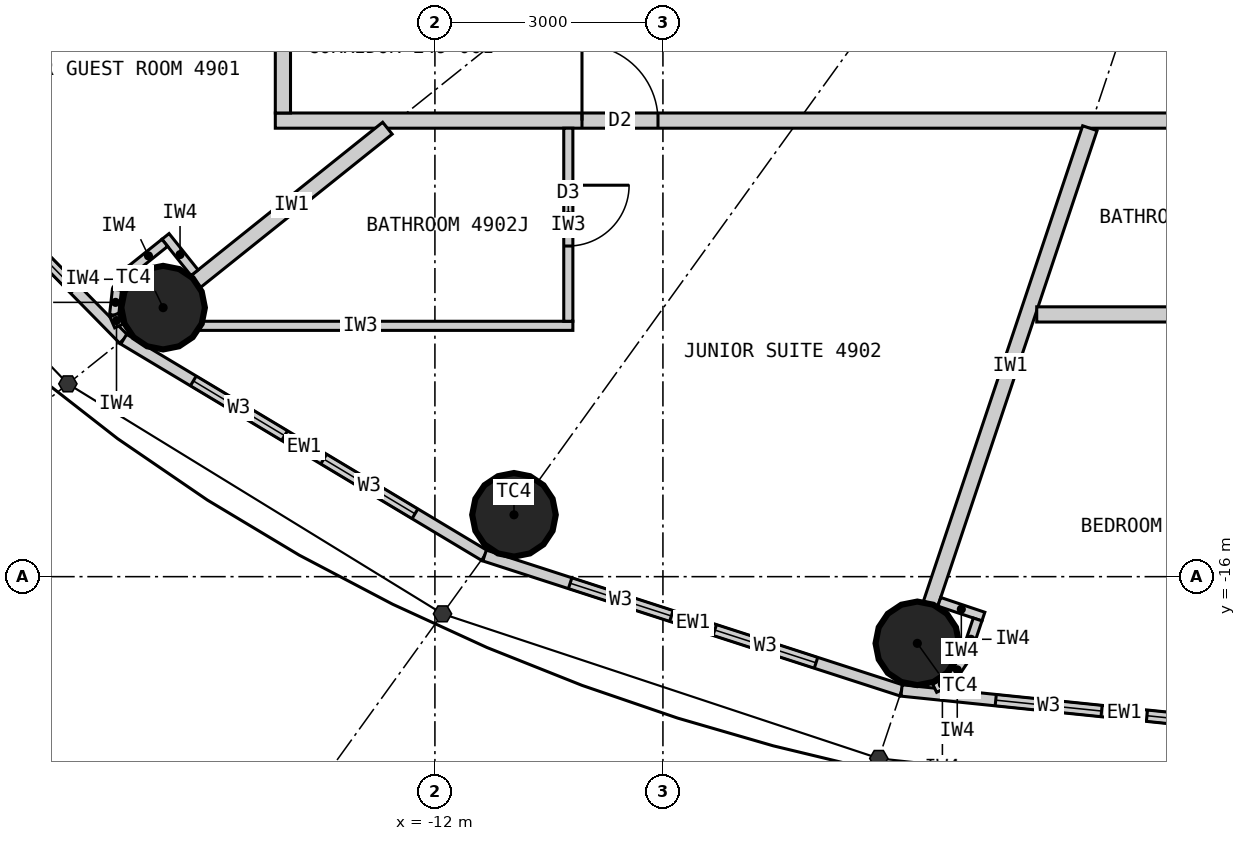
"""IFC4 building model, lengths in metres.
Left out: names, types, materials, properties, quantities, classifications, styles, units other than length and angle.
Written with IfcOpenShell. Run it as: python <this file> out.ifc"""

import sys

from ifc_helpers import new_model, si_unit, direction, frame, frame_2d, origin, origin_2d, place, context, subcontext, project, spatial, rectangle, circle, extrude, clip, halfspace, element, fill, save


model = new_model("IFC4")
c1 = context("Model", 3, precision=1e-05, world=origin(), true_north=direction((0.0, 1.0)))
c2 = subcontext(c1, "Body", "Model", "MODEL_VIEW")
j1 = project(units=[si_unit("LENGTHUNIT", "METRE"), si_unit("PLANEANGLEUNIT", "RADIAN")], contexts=[c1])
p1 = place(None, origin())
s1 = spatial("IfcSite", under=j1, at=p1, CompositionType="ELEMENT")
p2 = place(p1, origin())
s2 = spatial("IfcBuilding", under=s1, at=p2, CompositionType="ELEMENT")
p3 = place(p2, frame((0.0, 0.0, 183.0)))
s3 = spatial("IfcBuildingStorey", under=s2, at=p3, CompositionType="ELEMENT", Elevation=183.0)
for number, where, z_axis, x_axis in (
    (1, (-15.576, -12.461, 0.0), (0.0, 0.0, 1.0), (1.0, 0.0, 0.0)),
    (2, (-10.96, -15.186, 0.0), (0.0, 0.0, 1.0), (1.0, 0.0, 0.0)),
    (3, (-5.653, -16.877, 0.0), (0.0, 0.0, 1.0), (1.0, 0.0, 0.0)),
):
    element("IfcColumn", number, at=place(p3, frame(where, z_axis=z_axis, x_axis=x_axis)), inside=s3, PredefinedType="COLUMN", context=c2, shape_type="Clipping", body=[
        clip(extrude(circle(Radius=0.55, at=origin_2d()), origin(), (0.0, 0.0, 1.0), 3.3), halfspace(frame((0.0, 0.0, 2.25), z_axis=(0.0, 0.0, 1.0), x_axis=(1.0, 0.0, 0.0)), False)),
    ])
p4 = place(p3, frame((-19.772, -9.132, 0.0), z_axis=(0.0, 0.0, 1.0), x_axis=(0.700727467776, -0.71342905457, 0.0)))
e4 = element("IfcWall", 4, at=p4, inside=s3, PredefinedType="ELEMENTEDWALL", context=c2, shape_type="SweptSolid", body=[
    extrude(rectangle(XDim=5.247, YDim=0.15, at=frame_2d((2.624, 0.0))), origin(), (0.0, 0.0, 1.0), 3.05),
])
p5 = place(p4, frame((0.924, 0.0, 0.9)))
e5 = element("IfcOpeningElement", 5, at=p5, cuts=e4, PredefinedType="OPENING", context=c2, shape_type="SweptSolid", body=[
    extrude(rectangle(XDim=1.4, YDim=1.9, at=frame_2d((0.7, 0.95))), frame((0.0, 0.085, 0.0), z_axis=(0.0, -1.0, 0.0), x_axis=(1.0, 0.0, 0.0)), (0.0, 0.0, 1.0), 0.17),
])
p6 = place(p4, frame((2.924, 0.0, 0.9)))
e6 = element("IfcOpeningElement", 6, at=p6, cuts=e4, PredefinedType="OPENING", context=c2, shape_type="SweptSolid", body=[
    extrude(rectangle(XDim=1.4, YDim=1.9, at=frame_2d((0.7, 0.95))), frame((0.0, 0.085, 0.0), z_axis=(0.0, -1.0, 0.0), x_axis=(1.0, 0.0, 0.0)), (0.0, 0.0, 1.0), 0.17),
])
p7 = place(p3, frame((-16.095, -12.876, 0.0), z_axis=(0.0, 0.0, 1.0), x_axis=(0.857695199231, -0.514158482587, 0.0)))
e7 = element("IfcWall", 7, at=p7, inside=s3, PredefinedType="ELEMENTEDWALL", context=c2, shape_type="SweptSolid", body=[
    extrude(rectangle(XDim=5.536, YDim=0.15, at=frame_2d((2.768, 0.0))), origin(), (0.0, 0.0, 1.0), 3.05),
])
p8 = place(p7, frame((1.068, 0.0, 0.9)))
e8 = element("IfcOpeningElement", 8, at=p8, cuts=e7, PredefinedType="OPENING", context=c2, shape_type="SweptSolid", body=[
    extrude(rectangle(XDim=1.4, YDim=1.9, at=frame_2d((0.7, 0.95))), frame((0.0, 0.085, 0.0), z_axis=(0.0, -1.0, 0.0), x_axis=(1.0, 0.0, 0.0)), (0.0, 0.0, 1.0), 0.17),
])
p9 = place(p7, frame((3.068, 0.0, 0.9)))
e9 = element("IfcOpeningElement", 9, at=p9, cuts=e7, PredefinedType="OPENING", context=c2, shape_type="SweptSolid", body=[
    extrude(rectangle(XDim=1.4, YDim=1.9, at=frame_2d((0.7, 0.95))), frame((0.0, 0.085, 0.0), z_axis=(0.0, -1.0, 0.0), x_axis=(1.0, 0.0, 0.0)), (0.0, 0.0, 1.0), 0.17),
])
p10 = place(p3, frame((-11.346, -15.722, 0.0), z_axis=(0.0, 0.0, 1.0), x_axis=(0.951432482129, -0.307857486429, 0.0)))
e10 = element("IfcWall", 10, at=p10, inside=s3, PredefinedType="ELEMENTEDWALL", context=c2, shape_type="SweptSolid", body=[
    extrude(rectangle(XDim=5.766, YDim=0.15, at=frame_2d((2.883, 0.0))), origin(), (0.0, 0.0, 1.0), 3.05),
])
p11 = place(p10, frame((1.183, 0.0, 0.9)))
e11 = element("IfcOpeningElement", 11, at=p11, cuts=e10, PredefinedType="OPENING", context=c2, shape_type="SweptSolid", body=[
    extrude(rectangle(XDim=1.4, YDim=1.9, at=frame_2d((0.7, 0.95))), frame((0.0, 0.085, 0.0), z_axis=(0.0, -1.0, 0.0), x_axis=(1.0, 0.0, 0.0)), (0.0, 0.0, 1.0), 0.17),
])
p12 = place(p10, frame((3.183, 0.0, 0.9)))
e12 = element("IfcOpeningElement", 12, at=p12, cuts=e10, PredefinedType="OPENING", context=c2, shape_type="SweptSolid", body=[
    extrude(rectangle(XDim=1.4, YDim=1.9, at=frame_2d((0.7, 0.95))), frame((0.0, 0.085, 0.0), z_axis=(0.0, -1.0, 0.0), x_axis=(1.0, 0.0, 0.0)), (0.0, 0.0, 1.0), 0.17),
])
p13 = place(p3, frame((-5.86, -17.497, 0.0), z_axis=(0.0, 0.0, 1.0), x_axis=(0.994751738032, -0.102318032045, 0.0)))
e13 = element("IfcWall", 13, at=p13, inside=s3, PredefinedType="ELEMENTEDWALL", context=c2, shape_type="SweptSolid", body=[
    extrude(rectangle(XDim=5.891, YDim=0.15, at=frame_2d((2.946, 0.0))), origin(), (0.0, 0.0, 1.0), 3.05),
])
p14 = place(p13, frame((1.246, 0.0, 0.9)))
e14 = element("IfcOpeningElement", 14, at=p14, cuts=e13, PredefinedType="OPENING", context=c2, shape_type="SweptSolid", body=[
    extrude(rectangle(XDim=1.4, YDim=1.9, at=frame_2d((0.7, 0.95))), frame((0.0, 0.085, 0.0), z_axis=(0.0, -1.0, 0.0), x_axis=(1.0, 0.0, 0.0)), (0.0, 0.0, 1.0), 0.17),
])
p15 = place(p13, frame((3.246, 0.0, 0.9)))
e15 = element("IfcOpeningElement", 15, at=p15, cuts=e13, PredefinedType="OPENING", context=c2, shape_type="SweptSolid", body=[
    extrude(rectangle(XDim=1.4, YDim=1.9, at=frame_2d((0.7, 0.95))), frame((0.0, 0.085, 0.0), z_axis=(0.0, -1.0, 0.0), x_axis=(1.0, 0.0, 0.0)), (0.0, 0.0, 1.0), 0.17),
])
p16 = place(p3, frame((14.1, -10.0, 0.0), z_axis=(0.0, 0.0, 1.0), x_axis=(-1.0, 0.0, 0.0)))
e16 = element("IfcWall", 16, at=p16, inside=s3, PredefinedType="PARTITIONING", context=c2, shape_type="SweptSolid", body=[
    extrude(rectangle(XDim=28.2, YDim=0.2, at=frame_2d((14.1, 0.0))), origin(), (0.0, 0.0, 1.0), 3.05),
])
p17 = place(p16, frame((23.165, 0.0, 0.0)))
e17 = element("IfcOpeningElement", 17, at=p17, cuts=e16, PredefinedType="OPENING", context=c2, shape_type="SweptSolid", body=[
    extrude(rectangle(XDim=1.0, YDim=2.2, at=frame_2d((0.5, 1.1))), frame((0.0, 0.11, 0.0), z_axis=(0.0, -1.0, 0.0), x_axis=(1.0, 0.0, 0.0)), (0.0, 0.0, 1.0), 0.22),
])
p18 = place(p16, frame((9.94, 0.0, 0.0)))
e18 = element("IfcOpeningElement", 18, at=p18, cuts=e16, PredefinedType="OPENING", context=c2, shape_type="SweptSolid", body=[
    extrude(rectangle(XDim=1.0, YDim=2.2, at=frame_2d((0.5, 1.1))), frame((0.0, 0.11, 0.0), z_axis=(0.0, -1.0, 0.0), x_axis=(1.0, 0.0, 0.0)), (0.0, 0.0, 1.0), 0.22),
])
p19 = place(p3, frame((-14.0, 9.9, 0.0), z_axis=(0.0, 0.0, 1.0), x_axis=(0.0, -1.0, 0.0)))
e19 = element("IfcWall", 19, at=p19, inside=s3, PredefinedType="PARTITIONING", context=c2, shape_type="SweptSolid", body=[
    extrude(rectangle(XDim=19.8, YDim=0.2, at=frame_2d((9.9, 0.0))), origin(), (0.0, 0.0, 1.0), 3.05),
])
p20 = place(p19, frame((17.701, 0.0, 0.0)))
e20 = element("IfcOpeningElement", 20, at=p20, cuts=e19, PredefinedType="OPENING", context=c2, shape_type="SweptSolid", body=[
    extrude(rectangle(XDim=1.0, YDim=2.2, at=frame_2d((0.5, 1.1))), frame((0.0, 0.11, 0.0), z_axis=(0.0, -1.0, 0.0), x_axis=(1.0, 0.0, 0.0)), (0.0, 0.0, 1.0), 0.22),
])
p21 = place(p19, frame((1.1, 0.0, 0.0)))
e21 = element("IfcOpeningElement", 21, at=p21, cuts=e19, PredefinedType="OPENING", context=c2, shape_type="SweptSolid", body=[
    extrude(rectangle(XDim=1.0, YDim=2.2, at=frame_2d((0.5, 1.1))), frame((0.0, 0.11, 0.0), z_axis=(0.0, -1.0, 0.0), x_axis=(1.0, 0.0, 0.0)), (0.0, 0.0, 1.0), 0.22),
])
p22 = place(p19, frame((6.574, 0.0, 0.0)))
e22 = element("IfcOpeningElement", 22, at=p22, cuts=e19, PredefinedType="OPENING", context=c2, shape_type="SweptSolid", body=[
    extrude(rectangle(XDim=1.0, YDim=2.2, at=frame_2d((0.5, 1.1))), frame((0.0, 0.11, 0.0), z_axis=(0.0, -1.0, 0.0), x_axis=(1.0, 0.0, 0.0)), (0.0, 0.0, 1.0), 0.22),
])
p23 = place(p19, frame((12.465, 0.0, 0.0)))
e23 = element("IfcOpeningElement", 23, at=p23, cuts=e19, PredefinedType="OPENING", context=c2, shape_type="SweptSolid", body=[
    extrude(rectangle(XDim=1.0, YDim=2.1, at=frame_2d((0.5, 1.05))), frame((0.0, 0.11, 0.0), z_axis=(0.0, -1.0, 0.0), x_axis=(1.0, 0.0, 0.0)), (0.0, 0.0, 1.0), 0.22),
])
p24 = place(p3, frame((-12.625, -10.1, 0.0), z_axis=(0.0, 0.0, 1.0), x_axis=(-0.780876185034, -0.624685827954, 0.0)))
e24 = element("IfcWall", 24, at=p24, inside=s3, PredefinedType="PARTITIONING", context=c2, shape_type="SweptSolid", body=[
    extrude(rectangle(XDim=3.229, YDim=0.2, at=frame_2d((1.615, 0.0))), origin(), (0.0, 0.0, 1.0), 2.25),
])
p25 = place(p3, frame((-3.383, -10.1, 0.0), z_axis=(0.0, 0.0, 1.0), x_axis=(-0.317615120474, -0.948219718866, 0.0)))
e25 = element("IfcWall", 25, at=p25, inside=s3, PredefinedType="PARTITIONING", context=c2, shape_type="SweptSolid", body=[
    extrude(rectangle(XDim=6.597, YDim=0.2, at=frame_2d((3.299, 0.0))), origin(), (0.0, 0.0, 1.0), 2.15),
])
p26 = place(p3, frame((-15.775, -12.7, 0.0), z_axis=(0.0, 0.0, 1.0), x_axis=(1.0, 0.0, 0.0)))
e26 = element("IfcWall", 26, at=p26, inside=s3, PredefinedType="PARTITIONING", context=c2, shape_type="SweptSolid", body=[
    extrude(rectangle(XDim=5.59, YDim=0.12, at=frame_2d((2.795, 0.0))), origin(), (0.0, 0.0, 1.0), 3.05),
])
p27 = place(p3, frame((-10.245, -10.1, 0.0), z_axis=(0.0, 0.0, 1.0), x_axis=(0.0, -1.0, 0.0)))
e27 = element("IfcWall", 27, at=p27, inside=s3, PredefinedType="PARTITIONING", context=c2, shape_type="SweptSolid", body=[
    extrude(rectangle(XDim=2.54, YDim=0.12, at=frame_2d((1.27, 0.0))), origin(), (0.0, 0.0, 1.0), 3.05),
])
p28 = place(p27, frame((0.75, 0.0, 0.0)))
e28 = element("IfcOpeningElement", 28, at=p28, cuts=e27, PredefinedType="OPENING", context=c2, shape_type="SweptSolid", body=[
    extrude(rectangle(XDim=0.8, YDim=2.1, at=frame_2d((0.4, 1.05))), frame((0.0, 0.07, 0.0), z_axis=(0.0, -1.0, 0.0), x_axis=(1.0, 0.0, 0.0)), (0.0, 0.0, 1.0), 0.14),
])
p29 = place(p3, frame((-4.082, -12.55, 0.0), z_axis=(0.0, 0.0, 1.0), x_axis=(1.0, 0.0, 0.0)))
e29 = element("IfcWall", 29, at=p29, inside=s3, PredefinedType="PARTITIONING", context=c2, shape_type="SweptSolid", body=[
    extrude(rectangle(XDim=17.691, YDim=0.2, at=frame_2d((8.845, 0.0))), origin(), (0.0, 0.0, 1.0), 3.05),
])
p30 = place(p29, frame((2.449, 0.0, 0.0)))
e30 = element("IfcOpeningElement", 30, at=p30, cuts=e29, PredefinedType="OPENING", context=c2, shape_type="SweptSolid", body=[
    extrude(rectangle(XDim=0.8, YDim=2.1, at=frame_2d((0.4, 1.05))), frame((0.0, 0.11, 0.0), z_axis=(0.0, -1.0, 0.0), x_axis=(1.0, 0.0, 0.0)), (0.0, 0.0, 1.0), 0.22),
])
p31 = place(p29, frame((13.97, 0.0, 0.0)))
e31 = element("IfcOpeningElement", 31, at=p31, cuts=e29, PredefinedType="OPENING", context=c2, shape_type="SweptSolid", body=[
    extrude(rectangle(XDim=0.8, YDim=2.1, at=frame_2d((0.4, 1.05))), frame((0.0, 0.11, 0.0), z_axis=(0.0, -1.0, 0.0), x_axis=(1.0, 0.0, 0.0)), (0.0, 0.0, 1.0), 0.22),
])
p32 = place(p29, frame((8.42, 0.0, 0.0)))
e32 = element("IfcOpeningElement", 32, at=p32, cuts=e29, PredefinedType="OPENING", context=c2, shape_type="SweptSolid", body=[
    extrude(rectangle(XDim=0.9, YDim=2.1, at=frame_2d((0.45, 1.05))), frame((0.0, 0.11, 0.0), z_axis=(0.0, -1.0, 0.0), x_axis=(1.0, 0.0, 0.0)), (0.0, 0.0, 1.0), 0.22),
])
p33 = place(p3, frame((-15.162, -12.002, 0.0), z_axis=(0.0, 0.0, 1.0), x_axis=(-0.624597762427, 0.780946627607, 0.0)))
e33 = element("IfcWall", 33, at=p33, inside=s3, PredefinedType="PARTITIONING", context=c2, shape_type="SweptSolid", body=[
    extrude(rectangle(XDim=0.612, YDim=0.12, at=frame_2d((0.306, 0.0))), origin(), (0.0, 0.0, 1.0), 3.05),
])
p34 = place(p3, frame((-15.554, -11.608, 0.0), z_axis=(0.0, 0.0, 1.0), x_axis=(-0.780695577787, -0.624911525597, 0.0)))
e34 = element("IfcWall", 34, at=p34, inside=s3, PredefinedType="PARTITIONING", context=c2, shape_type="SweptSolid", body=[
    extrude(rectangle(XDim=0.55, YDim=0.12, at=frame_2d((0.275, 0.0))), origin(), (0.0, 0.0, 1.0), 3.05),
])
p35 = place(p3, frame((-15.984, -11.952, 0.0), z_axis=(0.0, 0.0, 1.0), x_axis=(-0.592335221171, -0.805691619517, 0.0)))
e35 = element("IfcWall", 35, at=p35, inside=s3, PredefinedType="PARTITIONING", context=c2, shape_type="SweptSolid", body=[
    extrude(rectangle(XDim=0.338, YDim=0.12, at=frame_2d((0.169, 0.0))), origin(), (0.0, 0.0, 1.0), 3.05),
])
p36 = place(p3, frame((-16.184, -12.224, 0.0), z_axis=(0.0, 0.0, 1.0), x_axis=(-0.110669692975, -0.993857242795, 0.0)))
e36 = element("IfcWall", 36, at=p36, inside=s3, PredefinedType="PARTITIONING", context=c2, shape_type="SweptSolid", body=[
    extrude(rectangle(XDim=0.337, YDim=0.12, at=frame_2d((0.169, 0.0))), origin(), (0.0, 0.0, 1.0), 3.05),
])
p37 = place(p3, frame((-16.221, -12.559, 0.0), z_axis=(0.0, 0.0, 1.0), x_axis=(0.401064416249, -0.916049853457, 0.0)))
e37 = element("IfcWall", 37, at=p37, inside=s3, PredefinedType="PARTITIONING", context=c2, shape_type="SweptSolid", body=[
    extrude(rectangle(XDim=0.156, YDim=0.12, at=frame_2d((0.078, 0.0))), origin(), (0.0, 0.0, 1.0), 3.05),
])
p38 = place(p3, frame((-5.364, -16.331, 0.0), z_axis=(0.0, 0.0, 1.0), x_axis=(0.948283770087, -0.317423835572, 0.0)))
e38 = element("IfcWall", 38, at=p38, inside=s3, PredefinedType="PARTITIONING", context=c2, shape_type="SweptSolid", body=[
    extrude(rectangle(XDim=0.612, YDim=0.12, at=frame_2d((0.306, 0.0))), origin(), (0.0, 0.0, 1.0), 3.05),
])
p39 = place(p3, frame((-4.86, -16.563, 0.0), z_axis=(0.0, 0.0, 1.0), x_axis=(-0.317825321803, -0.948149284038, 0.0)))
e39 = element("IfcWall", 39, at=p39, inside=s3, PredefinedType="PARTITIONING", context=c2, shape_type="SweptSolid", body=[
    extrude(rectangle(XDim=0.55, YDim=0.12, at=frame_2d((0.275, 0.0))), origin(), (0.0, 0.0, 1.0), 3.05),
])
p40 = place(p3, frame((-5.034, -17.084, 0.0), z_axis=(0.0, 0.0, 1.0), x_axis=(-0.552362205726, -0.833604218851, 0.0)))
e40 = element("IfcWall", 40, at=p40, inside=s3, PredefinedType="PARTITIONING", context=c2, shape_type="SweptSolid", body=[
    extrude(rectangle(XDim=0.338, YDim=0.12, at=frame_2d((0.169, 0.0))), origin(), (0.0, 0.0, 1.0), 3.05),
])
p41 = place(p3, frame((-5.221, -17.366, 0.0), z_axis=(0.0, 0.0, 1.0), x_axis=(-0.895067896179, -0.445929883759, 0.0)))
e41 = element("IfcWall", 41, at=p41, inside=s3, PredefinedType="PARTITIONING", context=c2, shape_type="SweptSolid", body=[
    extrude(rectangle(XDim=0.228, YDim=0.12, at=frame_2d((0.114, 0.0))), origin(), (0.0, 0.0, 1.0), 3.05),
])
p42 = place(p6, origin())
e42 = element("IfcWindow", 42, at=p42, inside=s3, PartitioningType="SINGLE_PANEL", PredefinedType="WINDOW", context=c2, shape_type="SweptSolid", body=[
    extrude(rectangle(XDim=1.4, YDim=1.9, at=frame_2d((0.7, 0.95))), frame((0.0, 0.03, 0.0), z_axis=(0.0, -1.0, 0.0), x_axis=(1.0, 0.0, 0.0)), (0.0, 0.0, 1.0), 0.06),
])
fill(e6, e42)
p43 = place(p8, origin())
e43 = element("IfcWindow", 43, at=p43, inside=s3, PartitioningType="SINGLE_PANEL", PredefinedType="WINDOW", context=c2, shape_type="SweptSolid", body=[
    extrude(rectangle(XDim=1.4, YDim=1.9, at=frame_2d((0.7, 0.95))), frame((0.0, 0.03, 0.0), z_axis=(0.0, -1.0, 0.0), x_axis=(1.0, 0.0, 0.0)), (0.0, 0.0, 1.0), 0.06),
])
fill(e8, e43)
p44 = place(p9, origin())
e44 = element("IfcWindow", 44, at=p44, inside=s3, PartitioningType="SINGLE_PANEL", PredefinedType="WINDOW", context=c2, shape_type="SweptSolid", body=[
    extrude(rectangle(XDim=1.4, YDim=1.9, at=frame_2d((0.7, 0.95))), frame((0.0, 0.03, 0.0), z_axis=(0.0, -1.0, 0.0), x_axis=(1.0, 0.0, 0.0)), (0.0, 0.0, 1.0), 0.06),
])
fill(e9, e44)
p45 = place(p11, origin())
e45 = element("IfcWindow", 45, at=p45, inside=s3, PartitioningType="SINGLE_PANEL", PredefinedType="WINDOW", context=c2, shape_type="SweptSolid", body=[
    extrude(rectangle(XDim=1.4, YDim=1.9, at=frame_2d((0.7, 0.95))), frame((0.0, 0.03, 0.0), z_axis=(0.0, -1.0, 0.0), x_axis=(1.0, 0.0, 0.0)), (0.0, 0.0, 1.0), 0.06),
])
fill(e11, e45)
p46 = place(p12, origin())
e46 = element("IfcWindow", 46, at=p46, inside=s3, PartitioningType="SINGLE_PANEL", PredefinedType="WINDOW", context=c2, shape_type="SweptSolid", body=[
    extrude(rectangle(XDim=1.4, YDim=1.9, at=frame_2d((0.7, 0.95))), frame((0.0, 0.03, 0.0), z_axis=(0.0, -1.0, 0.0), x_axis=(1.0, 0.0, 0.0)), (0.0, 0.0, 1.0), 0.06),
])
fill(e12, e46)
p47 = place(p14, origin())
e47 = element("IfcWindow", 47, at=p47, inside=s3, PartitioningType="SINGLE_PANEL", PredefinedType="WINDOW", context=c2, shape_type="SweptSolid", body=[
    extrude(rectangle(XDim=1.4, YDim=1.9, at=frame_2d((0.7, 0.95))), frame((0.0, 0.03, 0.0), z_axis=(0.0, -1.0, 0.0), x_axis=(1.0, 0.0, 0.0)), (0.0, 0.0, 1.0), 0.06),
])
fill(e14, e47)
p48 = place(p15, origin())
e48 = element("IfcWindow", 48, at=p48, inside=s3, PartitioningType="SINGLE_PANEL", PredefinedType="WINDOW", context=c2, shape_type="SweptSolid", body=[
    extrude(rectangle(XDim=1.4, YDim=1.9, at=frame_2d((0.7, 0.95))), frame((0.0, 0.03, 0.0), z_axis=(0.0, -1.0, 0.0), x_axis=(1.0, 0.0, 0.0)), (0.0, 0.0, 1.0), 0.06),
])
fill(e15, e48)
p49 = place(p28, origin())
e49 = element("IfcDoor", 49, at=p49, inside=s3, OperationType="SINGLE_SWING_LEFT", PredefinedType="DOOR", context=c2, shape_type="SweptSolid", body=[
    extrude(rectangle(XDim=0.8, YDim=2.1, at=frame_2d((0.4, 1.05))), frame((0.0, 0.025, 0.0), z_axis=(0.0, -1.0, 0.0), x_axis=(1.0, 0.0, 0.0)), (0.0, 0.0, 1.0), 0.05),
])
fill(e28, e49)
p50 = place(p17, origin())
e50 = element("IfcDoor", 50, at=p50, inside=s3, OperationType="SINGLE_SWING_RIGHT", PredefinedType="DOOR", context=c2, shape_type="SweptSolid", body=[
    extrude(rectangle(XDim=1.0, YDim=2.2, at=frame_2d((0.5, 1.1))), frame((0.0, 0.025, 0.0), z_axis=(0.0, -1.0, 0.0), x_axis=(1.0, 0.0, 0.0)), (0.0, 0.0, 1.0), 0.05),
])
fill(e17, e50)
save(model, sys.argv[1])
